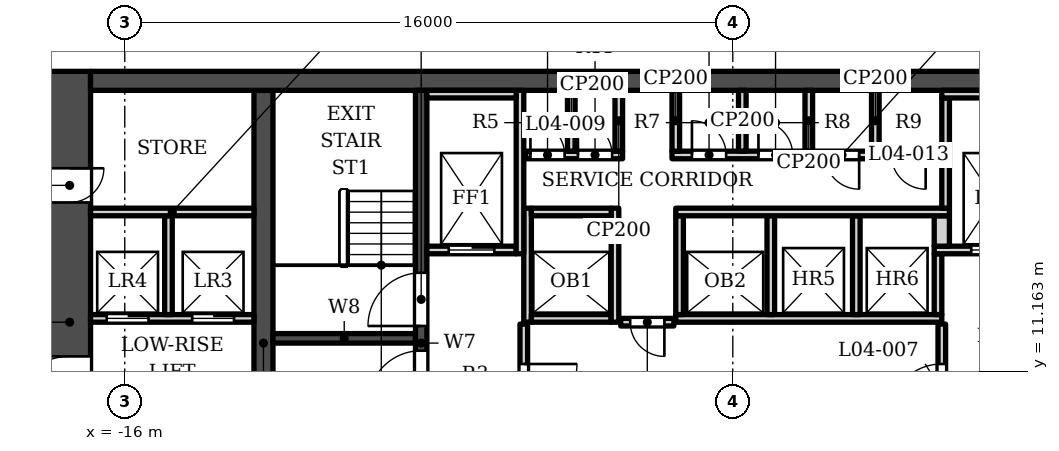
"""IFC4 building model, lengths in metres.
Left out: names, types, materials, properties, quantities, classifications, styles, units other than length and angle.
Written with IfcOpenShell. Run it as: python <this file> out.ifc"""

import sys

from ifc_helpers import new_model, si_unit, direction, frame, frame_2d, origin, place, context, subcontext, project, spatial, rectangle, extrude, element, fill, save


model = new_model("IFC4")
c1 = context("Model", 3, precision=1e-05, world=origin(), true_north=direction((0.0, 1.0)))
c2 = subcontext(c1, "Body", "Model", "MODEL_VIEW")
j1 = project(units=[si_unit("LENGTHUNIT", "METRE"), si_unit("PLANEANGLEUNIT", "RADIAN")], contexts=[c1])
p1 = place(None, origin())
s1 = spatial("IfcSite", under=j1, at=p1, CompositionType="ELEMENT")
p2 = place(p1, origin())
s2 = spatial("IfcBuilding", under=s1, at=p2, CompositionType="ELEMENT")
p3 = place(p2, frame((0.0, 0.0, 34.5)))
s3 = spatial("IfcBuildingStorey", under=s2, at=p3, CompositionType="ELEMENT", Elevation=34.5)
p4 = place(p3, frame((-16.9, 18.802, 0.0), z_axis=(0.0, 0.0, 1.0), x_axis=(1.0, 0.0, 0.0)))
e1 = element("IfcWall", 1, at=p4, inside=s3, PredefinedType="SHEAR", context=c2, shape_type="SweptSolid", body=[
    extrude(rectangle(XDim=33.8, YDim=0.5, at=frame_2d((16.9, 0.0))), origin(), (0.0, 0.0, 1.0), 5.5),
])
p5 = place(p3, frame((-12.35, 5.253, 0.0), z_axis=(0.0, 0.0, 1.0), x_axis=(0.0, 1.0, 0.0)))
e2 = element("IfcWall", 2, at=p5, inside=s3, PredefinedType="SHEAR", context=c2, shape_type="SweptSolid", body=[
    extrude(rectangle(XDim=13.3, YDim=0.5, at=frame_2d((6.65, 0.0))), origin(), (0.0, 0.0, 1.0), 5.5),
])
p6 = place(p3, frame((-8.2, 5.253, 0.0), z_axis=(0.0, 0.0, 1.0), x_axis=(0.0, 1.0, 0.0)))
e3 = element("IfcWall", 3, at=p6, inside=s3, PredefinedType="SHEAR", context=c2, shape_type="SweptSolid", body=[
    extrude(rectangle(XDim=13.3, YDim=0.3, at=frame_2d((6.65, 0.0))), origin(), (0.0, 0.0, 1.0), 5.5),
])
p7 = place(p6, frame((7.1, 0.0, 0.0)))
e4 = element("IfcOpeningElement", 4, at=p7, cuts=e3, PredefinedType="OPENING", context=c2, shape_type="SweptSolid", body=[
    extrude(rectangle(XDim=1.4, YDim=2.1, at=frame_2d((0.7, 1.05))), frame((0.0, 0.16, 0.0), z_axis=(0.0, -1.0, 0.0), x_axis=(1.0, 0.0, 0.0)), (0.0, 0.0, 1.0), 0.32),
])
p8 = place(p6, frame((5.05, 0.0, 0.0)))
e5 = element("IfcOpeningElement", 5, at=p8, cuts=e3, PredefinedType="OPENING", context=c2, shape_type="SweptSolid", body=[
    extrude(rectangle(XDim=1.4, YDim=2.1, at=frame_2d((0.7, 1.05))), frame((0.0, 0.16, 0.0), z_axis=(0.0, -1.0, 0.0), x_axis=(1.0, 0.0, 0.0)), (0.0, 0.0, 1.0), 0.32),
])
p9 = place(p3, frame((-12.1, 12.028, 0.0), z_axis=(0.0, 0.0, 1.0), x_axis=(1.0, 0.0, 0.0)))
e6 = element("IfcWall", 6, at=p9, inside=s3, PredefinedType="SHEAR", context=c2, shape_type="SweptSolid", body=[
    extrude(rectangle(XDim=3.75, YDim=0.25, at=frame_2d((1.875, 0.0))), origin(), (0.0, 0.0, 1.0), 5.5),
])
p10 = place(p3, frame((-17.45, 5.853, 0.0), z_axis=(0.0, 0.0, 1.0), x_axis=(0.0, 1.0, 0.0)))
e7 = element("IfcWall", 7, at=p10, inside=s3, PredefinedType="SHEAR", context=c2, shape_type="SweptSolid", body=[
    extrude(rectangle(XDim=13.2, YDim=1.1, at=frame_2d((6.6, 0.0))), origin(), (0.0, 0.0, 1.0), 5.5),
])
p11 = place(p10, frame((4.1, 0.0, 0.0)))
e8 = element("IfcOpeningElement", 8, at=p11, cuts=e7, PredefinedType="OPENING", context=c2, shape_type="SweptSolid", body=[
    extrude(rectangle(XDim=1.6, YDim=2.1, at=frame_2d((0.8, 1.05))), frame((0.0, 0.56, 0.0), z_axis=(0.0, -1.0, 0.0), x_axis=(1.0, 0.0, 0.0)), (0.0, 0.0, 1.0), 1.12),
])
p12 = place(p10, frame((9.75, 0.0, 0.0)))
e9 = element("IfcOpeningElement", 9, at=p12, cuts=e7, PredefinedType="OPENING", context=c2, shape_type="SweptSolid", body=[
    extrude(rectangle(XDim=0.9, YDim=2.1, at=frame_2d((0.45, 1.05))), frame((0.0, 0.56, 0.0), z_axis=(0.0, -1.0, 0.0), x_axis=(1.0, 0.0, 0.0)), (0.0, 0.0, 1.0), 1.12),
])
p13 = place(p3, frame((-5.5, 9.103, 0.0), z_axis=(0.0, 0.0, 1.0), x_axis=(0.0, 1.0, 0.0)))
e10 = element("IfcWall", 10, at=p13, inside=s3, PredefinedType="SOLIDWALL", context=c2, shape_type="SweptSolid", body=[
    extrude(rectangle(XDim=3.3, YDim=0.2, at=frame_2d((1.65, 0.0))), origin(), (0.0, 0.0, 1.0), 5.05),
])
p14 = place(p13, frame((0.85, 0.0, 0.0)))
e11 = element("IfcOpeningElement", 11, at=p14, cuts=e10, PredefinedType="OPENING", context=c2, shape_type="SweptSolid", body=[
    extrude(rectangle(XDim=1.4, YDim=2.1, at=frame_2d((0.7, 1.05))), frame((0.0, 0.11, 0.0), z_axis=(0.0, -1.0, 0.0), x_axis=(1.0, 0.0, 0.0)), (0.0, 0.0, 1.0), 0.22),
])
p15 = place(p3, frame((5.5, 9.103, 0.0), z_axis=(0.0, 0.0, 1.0), x_axis=(0.0, 1.0, 0.0)))
e12 = element("IfcWall", 12, at=p15, inside=s3, PredefinedType="SOLIDWALL", context=c2, shape_type="SweptSolid", body=[
    extrude(rectangle(XDim=3.3, YDim=0.2, at=frame_2d((1.65, 0.0))), origin(), (0.0, 0.0, 1.0), 5.05),
])
p16 = place(p15, frame((0.85, 0.0, 0.0)))
e13 = element("IfcOpeningElement", 13, at=p16, cuts=e12, PredefinedType="OPENING", context=c2, shape_type="SweptSolid", body=[
    extrude(rectangle(XDim=1.4, YDim=2.1, at=frame_2d((0.7, 1.05))), frame((0.0, 0.11, 0.0), z_axis=(0.0, -1.0, 0.0), x_axis=(1.0, 0.0, 0.0)), (0.0, 0.0, 1.0), 0.22),
])
p17 = place(p3, frame((-2.95, 12.453, 0.0), z_axis=(0.0, 0.0, 1.0), x_axis=(1.0, 0.0, 0.0)))
e14 = element("IfcWall", 14, at=p17, inside=s3, PredefinedType="SOLIDWALL", context=c2, shape_type="SweptSolid", body=[
    extrude(rectangle(XDim=1.4, YDim=0.2, at=frame_2d((0.7, 0.0))), origin(), (0.0, 0.0, 1.0), 5.05),
])
p18 = place(p17, frame((0.25, 0.0, 0.0)))
e15 = element("IfcOpeningElement", 15, at=p18, cuts=e14, PredefinedType="OPENING", context=c2, shape_type="SweptSolid", body=[
    extrude(rectangle(XDim=0.9, YDim=2.1, at=frame_2d((0.45, 1.05))), frame((0.0, 0.11, 0.0), z_axis=(0.0, -1.0, 0.0), x_axis=(1.0, 0.0, 0.0)), (0.0, 0.0, 1.0), 0.22),
])
p19 = place(p3, frame((-16.9, 12.552, 0.0), z_axis=(0.0, 0.0, 1.0), x_axis=(1.0, 0.0, 0.0)))
e16 = element("IfcWall", 16, at=p19, inside=s3, PredefinedType="SOLIDWALL", context=c2, shape_type="SweptSolid", body=[
    extrude(rectangle(XDim=4.3, YDim=0.2, at=frame_2d((2.15, 0.0))), origin(), (0.0, 0.0, 1.0), 5.05),
])
p20 = place(p19, frame((2.675, 0.0, 0.0)))
e17 = element("IfcOpeningElement", 17, at=p20, cuts=e16, PredefinedType="OPENING", context=c2, shape_type="SweptSolid", body=[
    extrude(rectangle(XDim=1.1, YDim=2.1, at=frame_2d((0.55, 1.05))), frame((0.0, 0.11, 0.0), z_axis=(0.0, -1.0, 0.0), x_axis=(1.0, 0.0, 0.0)), (0.0, 0.0, 1.0), 0.22),
])
p21 = place(p19, frame((0.425, 0.0, 0.0)))
e18 = element("IfcOpeningElement", 18, at=p21, cuts=e16, PredefinedType="OPENING", context=c2, shape_type="SweptSolid", body=[
    extrude(rectangle(XDim=1.1, YDim=2.1, at=frame_2d((0.55, 1.05))), frame((0.0, 0.11, 0.0), z_axis=(0.0, -1.0, 0.0), x_axis=(1.0, 0.0, 0.0)), (0.0, 0.0, 1.0), 0.22),
])
p22 = place(p3, frame((-5.4, 12.453, 0.0), z_axis=(0.0, 0.0, 1.0), x_axis=(0.0, 1.0, 0.0)))
e19 = element("IfcWall", 19, at=p22, inside=s3, PredefinedType="SOLIDWALL", context=c2, shape_type="SweptSolid", body=[
    extrude(rectangle(XDim=3.0, YDim=0.2, at=frame_2d((1.5, 0.0))), origin(), (0.0, 0.0, 1.0), 5.05),
])
p23 = place(p3, frame((-5.3, 12.552, 0.0), z_axis=(0.0, 0.0, 1.0), x_axis=(1.0, 0.0, 0.0)))
e20 = element("IfcWall", 20, at=p23, inside=s3, PredefinedType="SOLIDWALL", context=c2, shape_type="SweptSolid", body=[
    extrude(rectangle(XDim=2.1, YDim=0.2, at=frame_2d((1.05, 0.0))), origin(), (0.0, 0.0, 1.0), 5.05),
])
p24 = place(p3, frame((-3.1, 12.453, 0.0), z_axis=(0.0, 0.0, 1.0), x_axis=(0.0, 1.0, 0.0)))
e21 = element("IfcWall", 21, at=p24, inside=s3, PredefinedType="SOLIDWALL", context=c2, shape_type="SweptSolid", body=[
    extrude(rectangle(XDim=3.0, YDim=0.2, at=frame_2d((1.5, 0.0))), origin(), (0.0, 0.0, 1.0), 5.05),
])
p25 = place(p3, frame((-1.5, 12.552, 0.0), z_axis=(0.0, 0.0, 1.0), x_axis=(1.0, 0.0, 0.0)))
e22 = element("IfcWall", 22, at=p25, inside=s3, PredefinedType="SOLIDWALL", context=c2, shape_type="SweptSolid", body=[
    extrude(rectangle(XDim=7.0, YDim=0.2, at=frame_2d((3.5, 0.0))), origin(), (0.0, 0.0, 1.0), 5.05),
])
for number, where, z_axis, x_axis in (
    (23, (-14.85, 12.653, 0.0), (0.0, 0.0, 1.0), (0.0, 1.0, 0.0)),
    (24, (-1.4, 12.653, 0.0), (0.0, 0.0, 1.0), (0.0, 1.0, 0.0)),
    (25, (1.0, 12.653, 0.0), (0.0, 0.0, 1.0), (0.0, 1.0, 0.0)),
    (26, (3.25, 12.653, 0.0), (0.0, 0.0, 1.0), (0.0, 1.0, 0.0)),
):
    element("IfcWall", number, at=place(p3, frame(where, z_axis=z_axis, x_axis=x_axis)), inside=s3, PredefinedType="SOLIDWALL", context=c2, shape_type="SweptSolid", body=[
        extrude(rectangle(XDim=2.6, YDim=0.2, at=frame_2d((1.3, 0.0))), origin(), (0.0, 0.0, 1.0), 5.05),
    ])
p26 = place(p3, frame((5.4, 12.653, 0.0), z_axis=(0.0, 0.0, 1.0), x_axis=(0.0, 1.0, 0.0)))
e27 = element("IfcWall", 27, at=p26, inside=s3, PredefinedType="SOLIDWALL", context=c2, shape_type="SweptSolid", body=[
    extrude(rectangle(XDim=1.6, YDim=0.2, at=frame_2d((0.8, 0.0))), origin(), (0.0, 0.0, 1.0), 5.05),
])
p27 = place(p3, frame((-8.05, 14.353, 0.0), z_axis=(0.0, 0.0, 1.0), x_axis=(1.0, 0.0, 0.0)))
e28 = element("IfcWall", 28, at=p27, inside=s3, PredefinedType="SOLIDWALL", context=c2, shape_type="SweptSolid", body=[
    extrude(rectangle(XDim=2.35, YDim=0.2, at=frame_2d((1.175, 0.0))), origin(), (0.0, 0.0, 1.0), 5.05),
])
p28 = place(p27, frame((0.575, 0.0, 0.0)))
e29 = element("IfcOpeningElement", 29, at=p28, cuts=e28, PredefinedType="OPENING", context=c2, shape_type="SweptSolid", body=[
    extrude(rectangle(XDim=1.2, YDim=2.1, at=frame_2d((0.6, 1.05))), frame((0.0, 0.11, 0.0), z_axis=(0.0, -1.0, 0.0), x_axis=(1.0, 0.0, 0.0)), (0.0, 0.0, 1.0), 0.22),
])
p29 = place(p3, frame((-5.6, 14.253, 0.0), z_axis=(0.0, 0.0, 1.0), x_axis=(0.0, 1.0, 0.0)))
e30 = element("IfcWall", 30, at=p29, inside=s3, PredefinedType="SOLIDWALL", context=c2, shape_type="SweptSolid", body=[
    extrude(rectangle(XDim=4.3, YDim=0.2, at=frame_2d((2.15, 0.0))), origin(), (0.0, 0.0, 1.0), 5.05),
])
p30 = place(p3, frame((5.3, 14.353, 0.0), z_axis=(0.0, 0.0, 1.0), x_axis=(1.0, 0.0, 0.0)))
e31 = element("IfcWall", 31, at=p30, inside=s3, PredefinedType="SOLIDWALL", context=c2, shape_type="SweptSolid", body=[
    extrude(rectangle(XDim=2.75, YDim=0.2, at=frame_2d((1.375, 0.0))), origin(), (0.0, 0.0, 1.0), 5.05),
])
p31 = place(p30, frame((0.975, 0.0, 0.0)))
e32 = element("IfcOpeningElement", 32, at=p31, cuts=e31, PredefinedType="OPENING", context=c2, shape_type="SweptSolid", body=[
    extrude(rectangle(XDim=1.2, YDim=2.1, at=frame_2d((0.6, 1.05))), frame((0.0, 0.11, 0.0), z_axis=(0.0, -1.0, 0.0), x_axis=(1.0, 0.0, 0.0)), (0.0, 0.0, 1.0), 0.22),
])
p32 = place(p3, frame((5.5, 14.453, 0.0), z_axis=(0.0, 0.0, 1.0), x_axis=(0.0, 1.0, 0.0)))
e33 = element("IfcWall", 33, at=p32, inside=s3, PredefinedType="SOLIDWALL", context=c2, shape_type="SweptSolid", body=[
    extrude(rectangle(XDim=0.8, YDim=0.4, at=frame_2d((0.4, 0.0))), origin(), (0.0, 0.0, 1.0), 5.05),
])
p33 = place(p3, frame((-16.9, 15.353, 0.0), z_axis=(0.0, 0.0, 1.0), x_axis=(1.0, 0.0, 0.0)))
e34 = element("IfcWall", 34, at=p33, inside=s3, PredefinedType="SOLIDWALL", context=c2, shape_type="SweptSolid", body=[
    extrude(rectangle(XDim=4.3, YDim=0.2, at=frame_2d((2.15, 0.0))), origin(), (0.0, 0.0, 1.0), 5.05),
])
p34 = place(p3, frame((-5.3, 15.353, 0.0), z_axis=(0.0, 0.0, 1.0), x_axis=(1.0, 0.0, 0.0)))
e35 = element("IfcWall", 35, at=p34, inside=s3, PredefinedType="SOLIDWALL", context=c2, shape_type="SweptSolid", body=[
    extrude(rectangle(XDim=2.1, YDim=0.2, at=frame_2d((1.05, 0.0))), origin(), (0.0, 0.0, 1.0), 5.05),
])
p35 = place(p3, frame((-1.5, 15.353, 0.0), z_axis=(0.0, 0.0, 1.0), x_axis=(1.0, 0.0, 0.0)))
e36 = element("IfcWall", 36, at=p35, inside=s3, PredefinedType="SOLIDWALL", context=c2, shape_type="SweptSolid", body=[
    extrude(rectangle(XDim=7.2, YDim=0.2, at=frame_2d((3.6, 0.0))), origin(), (0.0, 0.0, 1.0), 5.05),
])
p36 = place(p3, frame((5.6, 15.453, 0.0), z_axis=(0.0, 0.0, 1.0), x_axis=(0.0, 1.0, 0.0)))
e37 = element("IfcWall", 37, at=p36, inside=s3, PredefinedType="SOLIDWALL", context=c2, shape_type="SweptSolid", body=[
    extrude(rectangle(XDim=2.9, YDim=0.2, at=frame_2d((1.45, 0.0))), origin(), (0.0, 0.0, 1.0), 5.05),
])
p37 = place(p3, frame((-5.45, 16.853, 0.0), z_axis=(0.0, 0.0, 1.0), x_axis=(1.0, 0.0, 0.0)))
e38 = element("IfcWall", 38, at=p37, inside=s3, PredefinedType="SOLIDWALL", context=c2, shape_type="SweptSolid", body=[
    extrude(rectangle(XDim=2.55, YDim=0.2, at=frame_2d((1.275, 0.0))), origin(), (0.0, 0.0, 1.0), 5.05),
])
p38 = place(p37, frame((0.125, 0.0, 0.0)))
e39 = element("IfcOpeningElement", 39, at=p38, cuts=e38, PredefinedType="OPENING", context=c2, shape_type="SweptSolid", body=[
    extrude(rectangle(XDim=0.9, YDim=2.1, at=frame_2d((0.45, 1.05))), frame((0.0, 0.11, 0.0), z_axis=(0.0, -1.0, 0.0), x_axis=(1.0, 0.0, 0.0)), (0.0, 0.0, 1.0), 0.22),
])
p39 = place(p37, frame((1.375, 0.0, 0.0)))
e40 = element("IfcOpeningElement", 40, at=p39, cuts=e38, PredefinedType="OPENING", context=c2, shape_type="SweptSolid", body=[
    extrude(rectangle(XDim=0.9, YDim=2.1, at=frame_2d((0.45, 1.05))), frame((0.0, 0.11, 0.0), z_axis=(0.0, -1.0, 0.0), x_axis=(1.0, 0.0, 0.0)), (0.0, 0.0, 1.0), 0.22),
])
p40 = place(p3, frame((-1.6, 16.853, 0.0), z_axis=(0.0, 0.0, 1.0), x_axis=(1.0, 0.0, 0.0)))
e41 = element("IfcWall", 41, at=p40, inside=s3, PredefinedType="SOLIDWALL", context=c2, shape_type="SweptSolid", body=[
    extrude(rectangle(XDim=7.05, YDim=0.2, at=frame_2d((3.525, 0.0))), origin(), (0.0, 0.0, 1.0), 5.05),
])
p41 = place(p40, frame((0.525, 0.0, 0.0)))
e42 = element("IfcOpeningElement", 42, at=p41, cuts=e41, PredefinedType="OPENING", context=c2, shape_type="SweptSolid", body=[
    extrude(rectangle(XDim=0.9, YDim=2.1, at=frame_2d((0.45, 1.05))), frame((0.0, 0.11, 0.0), z_axis=(0.0, -1.0, 0.0), x_axis=(1.0, 0.0, 0.0)), (0.0, 0.0, 1.0), 0.22),
])
p42 = place(p40, frame((2.275, 0.0, 0.0)))
e43 = element("IfcOpeningElement", 43, at=p42, cuts=e41, PredefinedType="OPENING", context=c2, shape_type="SweptSolid", body=[
    extrude(rectangle(XDim=0.9, YDim=2.1, at=frame_2d((0.45, 1.05))), frame((0.0, 0.11, 0.0), z_axis=(0.0, -1.0, 0.0), x_axis=(1.0, 0.0, 0.0)), (0.0, 0.0, 1.0), 0.22),
])
p43 = place(p40, frame((4.025, 0.0, 0.0)))
e44 = element("IfcOpeningElement", 44, at=p43, cuts=e41, PredefinedType="OPENING", context=c2, shape_type="SweptSolid", body=[
    extrude(rectangle(XDim=0.9, YDim=2.1, at=frame_2d((0.45, 1.05))), frame((0.0, 0.11, 0.0), z_axis=(0.0, -1.0, 0.0), x_axis=(1.0, 0.0, 0.0)), (0.0, 0.0, 1.0), 0.22),
])
p44 = place(p40, frame((5.775, 0.0, 0.0)))
e45 = element("IfcOpeningElement", 45, at=p44, cuts=e41, PredefinedType="OPENING", context=c2, shape_type="SweptSolid", body=[
    extrude(rectangle(XDim=0.9, YDim=2.1, at=frame_2d((0.45, 1.05))), frame((0.0, 0.11, 0.0), z_axis=(0.0, -1.0, 0.0), x_axis=(1.0, 0.0, 0.0)), (0.0, 0.0, 1.0), 0.22),
])
for number, where, z_axis, x_axis in (
    (46, (-4.25, 16.953, 0.0), (0.0, 0.0, 1.0), (0.0, 1.0, 0.0)),
    (47, (-3.0, 16.953, 0.0), (0.0, 0.0, 1.0), (0.0, 1.0, 0.0)),
    (48, (-1.5, 16.953, 0.0), (0.0, 0.0, 1.0), (0.0, 1.0, 0.0)),
    (49, (0.25, 16.953, 0.0), (0.0, 0.0, 1.0), (0.0, 1.0, 0.0)),
    (50, (2.0, 16.953, 0.0), (0.0, 0.0, 1.0), (0.0, 1.0, 0.0)),
    (51, (3.75, 16.953, 0.0), (0.0, 0.0, 1.0), (0.0, 1.0, 0.0)),
):
    element("IfcWall", number, at=place(p3, frame(where, z_axis=z_axis, x_axis=x_axis)), inside=s3, PredefinedType="PARTITIONING", context=c2, shape_type="SweptSolid", body=[
        extrude(rectangle(XDim=1.6, YDim=0.2, at=frame_2d((0.8, 0.0))), origin(), (0.0, 0.0, 1.0), 5.05),
    ])
p45 = place(p3, frame((-8.05, 18.453, 0.0), z_axis=(0.0, 0.0, 1.0), x_axis=(1.0, 0.0, 0.0)))
e52 = element("IfcWall", 52, at=p45, inside=s3, PredefinedType="SOLIDWALL", context=c2, shape_type="SweptSolid", body=[
    extrude(rectangle(XDim=2.35, YDim=0.2, at=frame_2d((1.175, 0.0))), origin(), (0.0, 0.0, 1.0), 5.05),
])
p46 = place(p3, frame((5.5, 18.453, 0.0), z_axis=(0.0, 0.0, 1.0), x_axis=(1.0, 0.0, 0.0)))
e53 = element("IfcWall", 53, at=p46, inside=s3, PredefinedType="SOLIDWALL", context=c2, shape_type="SweptSolid", body=[
    extrude(rectangle(XDim=2.55, YDim=0.2, at=frame_2d((1.275, 0.0))), origin(), (0.0, 0.0, 1.0), 5.05),
])
p47 = place(p28, origin())
e54 = element("IfcDoor", 54, at=p47, inside=s3, OperationType="DOUBLE_DOOR_SLIDING", PredefinedType="DOOR", context=c2, shape_type="SweptSolid", body=[
    extrude(rectangle(XDim=1.2, YDim=2.1, at=frame_2d((0.6, 1.05))), frame((0.0, 0.025, 0.0), z_axis=(0.0, -1.0, 0.0), x_axis=(1.0, 0.0, 0.0)), (0.0, 0.0, 1.0), 0.05),
])
fill(e29, e54)
p48 = place(p31, origin())
e55 = element("IfcDoor", 55, at=p48, inside=s3, OperationType="DOUBLE_DOOR_SLIDING", PredefinedType="DOOR", context=c2, shape_type="SweptSolid", body=[
    extrude(rectangle(XDim=1.2, YDim=2.1, at=frame_2d((0.6, 1.05))), frame((0.0, 0.025, 0.0), z_axis=(0.0, -1.0, 0.0), x_axis=(1.0, 0.0, 0.0)), (0.0, 0.0, 1.0), 0.05),
])
fill(e32, e55)
p49 = place(p20, origin())
e56 = element("IfcDoor", 56, at=p49, inside=s3, OperationType="DOUBLE_DOOR_SLIDING", PredefinedType="DOOR", context=c2, shape_type="SweptSolid", body=[
    extrude(rectangle(XDim=1.1, YDim=2.1, at=frame_2d((0.55, 1.05))), frame((0.0, 0.025, 0.0), z_axis=(0.0, -1.0, 0.0), x_axis=(1.0, 0.0, 0.0)), (0.0, 0.0, 1.0), 0.05),
])
fill(e17, e56)
p50 = place(p21, origin())
e57 = element("IfcDoor", 57, at=p50, inside=s3, OperationType="DOUBLE_DOOR_SLIDING", PredefinedType="DOOR", context=c2, shape_type="SweptSolid", body=[
    extrude(rectangle(XDim=1.1, YDim=2.1, at=frame_2d((0.55, 1.05))), frame((0.0, 0.025, 0.0), z_axis=(0.0, -1.0, 0.0), x_axis=(1.0, 0.0, 0.0)), (0.0, 0.0, 1.0), 0.05),
])
fill(e18, e57)
p51 = place(p7, origin())
e58 = element("IfcDoor", 58, at=p51, inside=s3, OperationType="SINGLE_SWING_LEFT", PredefinedType="DOOR", context=c2, shape_type="SweptSolid", body=[
    extrude(rectangle(XDim=1.4, YDim=2.1, at=frame_2d((0.7, 1.05))), frame((0.0, 0.025, 0.0), z_axis=(0.0, -1.0, 0.0), x_axis=(1.0, 0.0, 0.0)), (0.0, 0.0, 1.0), 0.05),
])
fill(e4, e58)
p52 = place(p8, origin())
e59 = element("IfcDoor", 59, at=p52, inside=s3, OperationType="SINGLE_SWING_LEFT", PredefinedType="DOOR", context=c2, shape_type="SweptSolid", body=[
    extrude(rectangle(XDim=1.4, YDim=2.1, at=frame_2d((0.7, 1.05))), frame((0.0, 0.025, 0.0), z_axis=(0.0, -1.0, 0.0), x_axis=(1.0, 0.0, 0.0)), (0.0, 0.0, 1.0), 0.05),
])
fill(e5, e59)
p53 = place(p18, origin())
e60 = element("IfcDoor", 60, at=p53, inside=s3, OperationType="SINGLE_SWING_RIGHT", PredefinedType="DOOR", context=c2, shape_type="SweptSolid", body=[
    extrude(rectangle(XDim=0.9, YDim=2.1, at=frame_2d((0.45, 1.05))), frame((0.0, 0.025, 0.0), z_axis=(0.0, -1.0, 0.0), x_axis=(1.0, 0.0, 0.0)), (0.0, 0.0, 1.0), 0.05),
])
fill(e15, e60)
p54 = place(p14, origin())
e61 = element("IfcDoor", 61, at=p54, inside=s3, OperationType="SINGLE_SWING_RIGHT", PredefinedType="DOOR", context=c2, shape_type="SweptSolid", body=[
    extrude(rectangle(XDim=1.4, YDim=2.1, at=frame_2d((0.7, 1.05))), frame((0.0, 0.025, 0.0), z_axis=(0.0, -1.0, 0.0), x_axis=(1.0, 0.0, 0.0)), (0.0, 0.0, 1.0), 0.05),
])
fill(e11, e61)
p55 = place(p16, origin())
e62 = element("IfcDoor", 62, at=p55, inside=s3, OperationType="SINGLE_SWING_LEFT", PredefinedType="DOOR", context=c2, shape_type="SweptSolid", body=[
    extrude(rectangle(XDim=1.4, YDim=2.1, at=frame_2d((0.7, 1.05))), frame((0.0, 0.025, 0.0), z_axis=(0.0, -1.0, 0.0), x_axis=(1.0, 0.0, 0.0)), (0.0, 0.0, 1.0), 0.05),
])
fill(e13, e62)
p56 = place(p38, origin())
e63 = element("IfcDoor", 63, at=p56, inside=s3, OperationType="SINGLE_SWING_LEFT", PredefinedType="DOOR", context=c2, shape_type="SweptSolid", body=[
    extrude(rectangle(XDim=0.9, YDim=2.1, at=frame_2d((0.45, 1.05))), frame((0.0, 0.025, 0.0), z_axis=(0.0, -1.0, 0.0), x_axis=(1.0, 0.0, 0.0)), (0.0, 0.0, 1.0), 0.05),
])
fill(e39, e63)
p57 = place(p39, origin())
e64 = element("IfcDoor", 64, at=p57, inside=s3, OperationType="SINGLE_SWING_LEFT", PredefinedType="DOOR", context=c2, shape_type="SweptSolid", body=[
    extrude(rectangle(XDim=0.9, YDim=2.1, at=frame_2d((0.45, 1.05))), frame((0.0, 0.025, 0.0), z_axis=(0.0, -1.0, 0.0), x_axis=(1.0, 0.0, 0.0)), (0.0, 0.0, 1.0), 0.05),
])
fill(e40, e64)
p58 = place(p41, origin())
e65 = element("IfcDoor", 65, at=p58, inside=s3, OperationType="SINGLE_SWING_LEFT", PredefinedType="DOOR", context=c2, shape_type="SweptSolid", body=[
    extrude(rectangle(XDim=0.9, YDim=2.1, at=frame_2d((0.45, 1.05))), frame((0.0, 0.025, 0.0), z_axis=(0.0, -1.0, 0.0), x_axis=(1.0, 0.0, 0.0)), (0.0, 0.0, 1.0), 0.05),
])
fill(e42, e65)
p59 = place(p42, origin())
e66 = element("IfcDoor", 66, at=p59, inside=s3, OperationType="SINGLE_SWING_LEFT", PredefinedType="DOOR", context=c2, shape_type="SweptSolid", body=[
    extrude(rectangle(XDim=0.9, YDim=2.1, at=frame_2d((0.45, 1.05))), frame((0.0, 0.025, 0.0), z_axis=(0.0, -1.0, 0.0), x_axis=(1.0, 0.0, 0.0)), (0.0, 0.0, 1.0), 0.05),
])
fill(e43, e66)
p60 = place(p43, origin())
e67 = element("IfcDoor", 67, at=p60, inside=s3, OperationType="SINGLE_SWING_RIGHT", PredefinedType="DOOR", context=c2, shape_type="SweptSolid", body=[
    extrude(rectangle(XDim=0.9, YDim=2.1, at=frame_2d((0.45, 1.05))), frame((0.0, 0.025, 0.0), z_axis=(0.0, -1.0, 0.0), x_axis=(1.0, 0.0, 0.0)), (0.0, 0.0, 1.0), 0.05),
])
fill(e44, e67)
p61 = place(p44, origin())
e68 = element("IfcDoor", 68, at=p61, inside=s3, OperationType="SINGLE_SWING_RIGHT", PredefinedType="DOOR", context=c2, shape_type="SweptSolid", body=[
    extrude(rectangle(XDim=0.9, YDim=2.1, at=frame_2d((0.45, 1.05))), frame((0.0, 0.025, 0.0), z_axis=(0.0, -1.0, 0.0), x_axis=(1.0, 0.0, 0.0)), (0.0, 0.0, 1.0), 0.05),
])
fill(e45, e68)
p62 = place(p11, origin())
e69 = element("IfcDoor", 69, at=p62, inside=s3, OperationType="DOUBLE_DOOR_SINGLE_SWING", PredefinedType="DOOR", context=c2, shape_type="SweptSolid", body=[
    extrude(rectangle(XDim=1.6, YDim=2.1, at=frame_2d((0.8, 1.05))), frame((0.0, -0.225, 0.0), z_axis=(0.0, -1.0, 0.0), x_axis=(1.0, 0.0, 0.0)), (0.0, 0.0, 1.0), 0.05),
])
fill(e8, e69)
p63 = place(p12, origin())
e70 = element("IfcDoor", 70, at=p63, inside=s3, OperationType="SINGLE_SWING_RIGHT", PredefinedType="DOOR", context=c2, shape_type="SweptSolid", body=[
    extrude(rectangle(XDim=0.9, YDim=2.1, at=frame_2d((0.45, 1.05))), frame((0.0, -0.225, 0.0), z_axis=(0.0, -1.0, 0.0), x_axis=(1.0, 0.0, 0.0)), (0.0, 0.0, 1.0), 0.05),
])
fill(e9, e70)
save(model, sys.argv[1])
